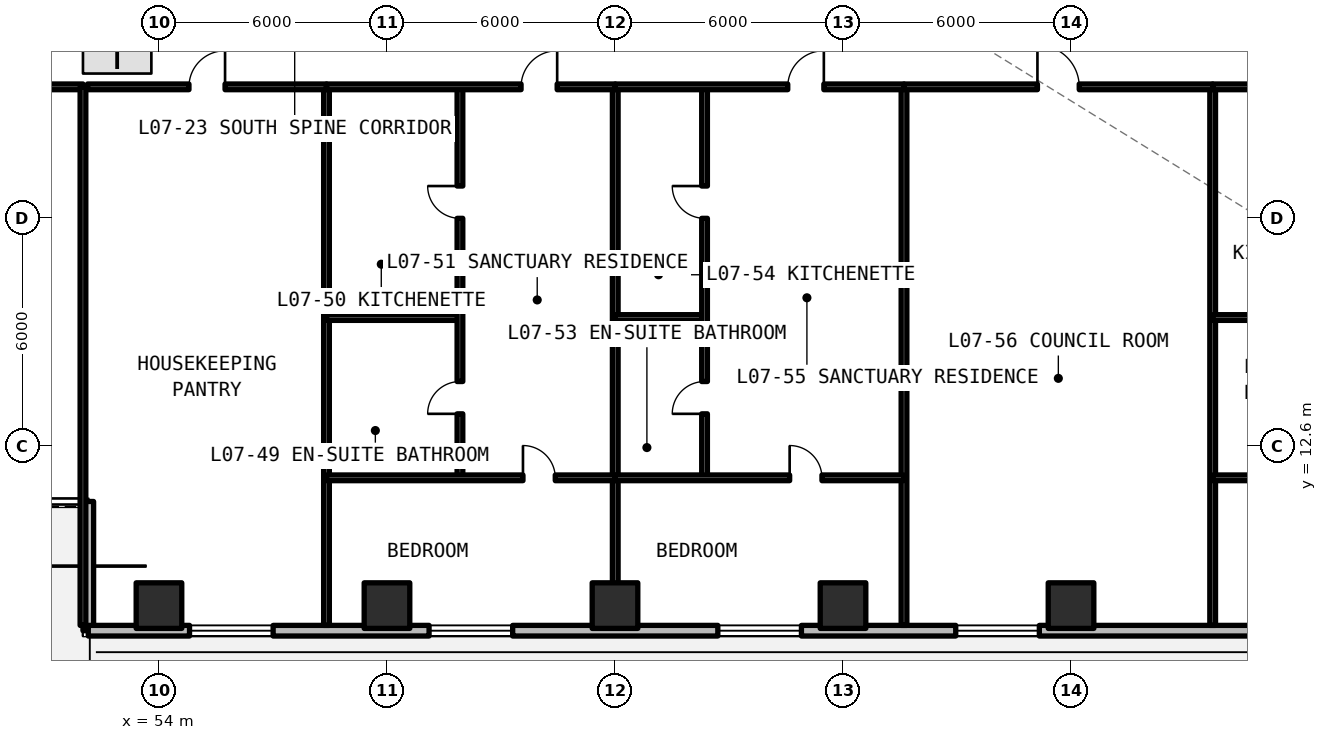
"""IFC4 building model, lengths in metres.
Left out: names, types, materials, properties, quantities, classifications, styles, units other than length and angle.
Written with IfcOpenShell. Run it as: python <this file> out.ifc"""

import sys

from ifc_helpers import new_model, si_unit, direction, frame, frame_2d, origin, origin_2d, place, context, subcontext, project, spatial, rectangle, extrude, element, fill, save


model = new_model("IFC4")
c1 = context("Model", 3, precision=1e-05, world=origin(), true_north=direction((0.0, 1.0)))
c2 = subcontext(c1, "Body", "Model", "MODEL_VIEW")
j1 = project(units=[si_unit("LENGTHUNIT", "METRE"), si_unit("PLANEANGLEUNIT", "RADIAN")], contexts=[c1])
p1 = place(None, origin())
s1 = spatial("IfcSite", under=j1, at=p1, CompositionType="ELEMENT")
p2 = place(p1, origin())
s2 = spatial("IfcBuilding", under=s1, at=p2, CompositionType="ELEMENT")
p3 = place(p2, frame((0.0, 0.0, 29.04)))
s3 = spatial("IfcBuildingStorey", under=s2, at=p3, CompositionType="ELEMENT", Elevation=29.04)
for number, where, z_axis, x_axis in (
    (1, (54.0, 8.4, -0.24), (0.0, 0.0, 1.0), (1.0, 0.0, 0.0)),
    (2, (60.0, 8.4, -0.24), (0.0, 0.0, 1.0), (1.0, 0.0, 0.0)),
    (3, (66.0, 8.4, -0.24), (0.0, 0.0, 1.0), (1.0, 0.0, 0.0)),
    (4, (72.0, 8.4, -0.24), (0.0, 0.0, 1.0), (1.0, 0.0, 0.0)),
    (5, (78.0, 8.4, -0.24), (0.0, 0.0, 1.0), (1.0, 0.0, 0.0)),
):
    element("IfcColumn", number, at=place(p3, frame(where, z_axis=z_axis, x_axis=x_axis)), inside=s3, PredefinedType="COLUMN", context=c2, shape_type="SweptSolid", body=[
        extrude(rectangle(XDim=1.2, YDim=1.2, at=origin_2d()), origin(), (0.0, 0.0, 1.0), 3.54),
    ])
p4 = place(p3, frame((52.14, 11.14, 0.0), z_axis=(0.0, 0.0, 1.0), x_axis=(0.0, -1.0, 0.0)))
e6 = element("IfcWall", 6, at=p4, inside=s3, PredefinedType="SOLIDWALL", context=c2, shape_type="SweptSolid", body=[
    extrude(rectangle(XDim=3.4, YDim=0.28, at=frame_2d((1.7, 0.0))), origin(), (0.0, 0.0, 1.0), 3.08),
])
p5 = place(p3, frame((52.14, 7.74, 0.0), z_axis=(0.0, 0.0, 1.0), x_axis=(1.0, 0.0, 0.0)))
e7 = element("IfcWall", 7, at=p5, inside=s3, PredefinedType="SOLIDWALL", context=c2, shape_type="SweptSolid", body=[
    extrude(rectangle(XDim=44.402, YDim=0.28, at=frame_2d((22.201, 0.0))), origin(), (0.0, 0.0, 1.0), 3.08),
])
p6 = place(p5, frame((2.664, 0.0, 0.78)))
e8 = element("IfcOpeningElement", 8, at=p6, cuts=e7, PredefinedType="OPENING", context=c2, shape_type="SweptSolid", body=[
    extrude(rectangle(XDim=2.2, YDim=1.66, at=frame_2d((1.1, 0.83))), frame((0.0, 0.15, 0.0), z_axis=(0.0, -1.0, 0.0), x_axis=(1.0, 0.0, 0.0)), (0.0, 0.0, 1.0), 0.3),
])
p7 = place(p5, frame((8.967, 0.0, 0.78)))
e9 = element("IfcOpeningElement", 9, at=p7, cuts=e7, PredefinedType="OPENING", context=c2, shape_type="SweptSolid", body=[
    extrude(rectangle(XDim=2.2, YDim=1.66, at=frame_2d((1.1, 0.83))), frame((0.0, 0.15, 0.0), z_axis=(0.0, -1.0, 0.0), x_axis=(1.0, 0.0, 0.0)), (0.0, 0.0, 1.0), 0.3),
])
p8 = place(p5, frame((16.566, 0.0, 0.78)))
e10 = element("IfcOpeningElement", 10, at=p8, cuts=e7, PredefinedType="OPENING", context=c2, shape_type="SweptSolid", body=[
    extrude(rectangle(XDim=2.2, YDim=1.66, at=frame_2d((1.1, 0.83))), frame((0.0, 0.15, 0.0), z_axis=(0.0, -1.0, 0.0), x_axis=(1.0, 0.0, 0.0)), (0.0, 0.0, 1.0), 0.3),
])
p9 = place(p5, frame((22.826, 0.0, 0.78)))
e11 = element("IfcOpeningElement", 11, at=p9, cuts=e7, PredefinedType="OPENING", context=c2, shape_type="SweptSolid", body=[
    extrude(rectangle(XDim=2.2, YDim=1.66, at=frame_2d((1.1, 0.83))), frame((0.0, 0.15, 0.0), z_axis=(0.0, -1.0, 0.0), x_axis=(1.0, 0.0, 0.0)), (0.0, 0.0, 1.0), 0.3),
])
p10 = place(p5, frame((32.766, 0.0, 0.78)))
e12 = element("IfcOpeningElement", 12, at=p10, cuts=e7, PredefinedType="OPENING", context=c2, shape_type="SweptSolid", body=[
    extrude(rectangle(XDim=2.2, YDim=1.66, at=frame_2d((1.1, 0.83))), frame((0.0, 0.15, 0.0), z_axis=(0.0, -1.0, 0.0), x_axis=(1.0, 0.0, 0.0)), (0.0, 0.0, 1.0), 0.3),
])
p11 = place(p5, frame((38.548, 0.0, 0.78)))
e13 = element("IfcOpeningElement", 13, at=p11, cuts=e7, PredefinedType="OPENING", context=c2, shape_type="SweptSolid", body=[
    extrude(rectangle(XDim=0.85, YDim=1.65, at=frame_2d((0.425, 0.825))), frame((0.0, 0.15, 0.0), z_axis=(0.0, -1.0, 0.0), x_axis=(1.0, 0.0, 0.0)), (0.0, 0.0, 1.0), 0.3),
])
p12 = place(p5, frame((40.91, 0.0, 0.78)))
e14 = element("IfcOpeningElement", 14, at=p12, cuts=e7, PredefinedType="OPENING", context=c2, shape_type="SweptSolid", body=[
    extrude(rectangle(XDim=2.2, YDim=1.66, at=frame_2d((1.1, 0.83))), frame((0.0, 0.15, 0.0), z_axis=(0.0, -1.0, 0.0), x_axis=(1.0, 0.0, 0.0)), (0.0, 0.0, 1.0), 0.3),
])
p13 = place(p3, frame((43.6, 22.05, 0.0), z_axis=(0.0, 0.0, 1.0), x_axis=(1.0, 0.0, 0.0)))
e15 = element("IfcWall", 15, at=p13, inside=s3, PredefinedType="SOLIDWALL", context=c2, shape_type="SweptSolid", body=[
    extrude(rectangle(XDim=8.4, YDim=0.15, at=frame_2d((4.2, 0.0))), origin(), (0.0, 0.0, 1.0), 2.35),
])
p14 = place(p13, frame((3.65, 0.0, 0.0)))
e16 = element("IfcOpeningElement", 16, at=p14, cuts=e15, PredefinedType="OPENING", context=c2, shape_type="SweptSolid", body=[
    extrude(rectangle(XDim=1.1, YDim=2.15, at=frame_2d((0.55, 1.075))), frame((0.0, 0.085, 0.0), z_axis=(0.0, -1.0, 0.0), x_axis=(1.0, 0.0, 0.0)), (0.0, 0.0, 1.0), 0.17),
])
for number, where, z_axis, x_axis in (
    (17, (52.0, 7.88, 0.0), (0.0, 0.0, 1.0), (0.0, 1.0, 0.0)),
    (18, (58.408, 7.88, 0.0), (0.0, 0.0, 1.0), (0.0, 1.0, 0.0)),
):
    element("IfcWall", number, at=place(p3, frame(where, z_axis=z_axis, x_axis=x_axis)), inside=s3, PredefinedType="SOLIDWALL", context=c2, shape_type="SweptSolid", body=[
        extrude(rectangle(XDim=14.17, YDim=0.15, at=frame_2d((7.085, 0.0))), origin(), (0.0, 0.0, 1.0), 2.35),
    ])
p15 = place(p3, frame((52.12, 22.05, 0.0), z_axis=(0.0, 0.0, 1.0), x_axis=(1.0, 0.0, 0.0)))
e19 = element("IfcWall", 19, at=p15, inside=s3, PredefinedType="SOLIDWALL", context=c2, shape_type="SweptSolid", body=[
    extrude(rectangle(XDim=6.288, YDim=0.15, at=frame_2d((3.144, 0.0))), origin(), (0.0, 0.0, 1.0), 2.35),
])
p16 = place(p15, frame((2.669, 0.0, 0.0)))
e20 = element("IfcOpeningElement", 20, at=p16, cuts=e19, PredefinedType="OPENING", context=c2, shape_type="SweptSolid", body=[
    extrude(rectangle(XDim=0.95, YDim=2.15, at=frame_2d((0.475, 1.075))), frame((0.0, 0.085, 0.0), z_axis=(0.0, -1.0, 0.0), x_axis=(1.0, 0.0, 0.0)), (0.0, 0.0, 1.0), 0.17),
])
p17 = place(p3, frame((66.007, 7.88, 0.0), z_axis=(0.0, 0.0, 1.0), x_axis=(0.0, 1.0, 0.0)))
e21 = element("IfcWall", 21, at=p17, inside=s3, PredefinedType="SOLIDWALL", context=c2, shape_type="SweptSolid", body=[
    extrude(rectangle(XDim=14.17, YDim=0.15, at=frame_2d((7.085, 0.0))), origin(), (0.0, 0.0, 1.0), 2.35),
])
p18 = place(p3, frame((58.408, 15.98, 0.0), z_axis=(0.0, 0.0, 1.0), x_axis=(1.0, 0.0, 0.0)))
e22 = element("IfcWall", 22, at=p18, inside=s3, PredefinedType="PARTITIONING", context=c2, shape_type="SweptSolid", body=[
    extrude(rectangle(XDim=3.512, YDim=0.15, at=frame_2d((1.756, 0.0))), origin(), (0.0, 0.0, 1.0), 2.35),
])
p19 = place(p3, frame((61.92, 11.762, 0.0), z_axis=(0.0, 0.0, 1.0), x_axis=(0.0, 1.0, 0.0)))
e23 = element("IfcWall", 23, at=p19, inside=s3, PredefinedType="PARTITIONING", context=c2, shape_type="SweptSolid", body=[
    extrude(rectangle(XDim=10.288, YDim=0.15, at=frame_2d((5.144, 0.0))), origin(), (0.0, 0.0, 1.0), 2.35),
])
p20 = place(p19, frame((1.684, 0.0, 0.0)))
e24 = element("IfcOpeningElement", 24, at=p20, cuts=e23, PredefinedType="OPENING", context=c2, shape_type="SweptSolid", body=[
    extrude(rectangle(XDim=0.85, YDim=2.1, at=frame_2d((0.425, 1.05))), frame((0.0, 0.085, 0.0), z_axis=(0.0, -1.0, 0.0), x_axis=(1.0, 0.0, 0.0)), (0.0, 0.0, 1.0), 0.17),
])
p21 = place(p19, frame((6.828, 0.0, 0.0)))
e25 = element("IfcOpeningElement", 25, at=p21, cuts=e23, PredefinedType="OPENING", context=c2, shape_type="SweptSolid", body=[
    extrude(rectangle(XDim=0.85, YDim=2.1, at=frame_2d((0.425, 1.05))), frame((0.0, 0.085, 0.0), z_axis=(0.0, -1.0, 0.0), x_axis=(1.0, 0.0, 0.0)), (0.0, 0.0, 1.0), 0.17),
])
p22 = place(p3, frame((58.408, 11.762, 0.0), z_axis=(0.0, 0.0, 1.0), x_axis=(1.0, 0.0, 0.0)))
e26 = element("IfcWall", 26, at=p22, inside=s3, PredefinedType="PARTITIONING", context=c2, shape_type="SweptSolid", body=[
    extrude(rectangle(XDim=7.598, YDim=0.15, at=frame_2d((3.799, 0.0))), origin(), (0.0, 0.0, 1.0), 2.35),
])
p23 = place(p22, frame((5.17, 0.0, 0.0)))
e27 = element("IfcOpeningElement", 27, at=p23, cuts=e26, PredefinedType="OPENING", context=c2, shape_type="SweptSolid", body=[
    extrude(rectangle(XDim=0.85, YDim=2.1, at=frame_2d((0.425, 1.05))), frame((0.0, 0.085, 0.0), z_axis=(0.0, -1.0, 0.0), x_axis=(1.0, 0.0, 0.0)), (0.0, 0.0, 1.0), 0.17),
])
p24 = place(p3, frame((58.408, 22.05, 0.0), z_axis=(0.0, 0.0, 1.0), x_axis=(1.0, 0.0, 0.0)))
e28 = element("IfcWall", 28, at=p24, inside=s3, PredefinedType="SOLIDWALL", context=c2, shape_type="SweptSolid", body=[
    extrude(rectangle(XDim=7.598, YDim=0.15, at=frame_2d((3.799, 0.0))), origin(), (0.0, 0.0, 1.0), 2.35),
])
p25 = place(p24, frame((5.12, 0.0, 0.0)))
e29 = element("IfcOpeningElement", 29, at=p25, cuts=e28, PredefinedType="OPENING", context=c2, shape_type="SweptSolid", body=[
    extrude(rectangle(XDim=0.95, YDim=2.15, at=frame_2d((0.475, 1.075))), frame((0.0, 0.085, 0.0), z_axis=(0.0, -1.0, 0.0), x_axis=(1.0, 0.0, 0.0)), (0.0, 0.0, 1.0), 0.17),
])
p26 = place(p3, frame((73.605, 7.88, 0.0), z_axis=(0.0, 0.0, 1.0), x_axis=(0.0, 1.0, 0.0)))
e30 = element("IfcWall", 30, at=p26, inside=s3, PredefinedType="SOLIDWALL", context=c2, shape_type="SweptSolid", body=[
    extrude(rectangle(XDim=14.17, YDim=0.15, at=frame_2d((7.085, 0.0))), origin(), (0.0, 0.0, 1.0), 2.35),
])
p27 = place(p3, frame((66.007, 15.98, 0.0), z_axis=(0.0, 0.0, 1.0), x_axis=(1.0, 0.0, 0.0)))
e31 = element("IfcWall", 31, at=p27, inside=s3, PredefinedType="PARTITIONING", context=c2, shape_type="SweptSolid", body=[
    extrude(rectangle(XDim=2.35, YDim=0.15, at=frame_2d((1.175, 0.0))), origin(), (0.0, 0.0, 1.0), 2.35),
])
p28 = place(p3, frame((68.357, 11.762, 0.0), z_axis=(0.0, 0.0, 1.0), x_axis=(0.0, 1.0, 0.0)))
e32 = element("IfcWall", 32, at=p28, inside=s3, PredefinedType="PARTITIONING", context=c2, shape_type="SweptSolid", body=[
    extrude(rectangle(XDim=10.288, YDim=0.15, at=frame_2d((5.144, 0.0))), origin(), (0.0, 0.0, 1.0), 2.35),
])
p29 = place(p28, frame((1.684, 0.0, 0.0)))
e33 = element("IfcOpeningElement", 33, at=p29, cuts=e32, PredefinedType="OPENING", context=c2, shape_type="SweptSolid", body=[
    extrude(rectangle(XDim=0.85, YDim=2.1, at=frame_2d((0.425, 1.05))), frame((0.0, 0.085, 0.0), z_axis=(0.0, -1.0, 0.0), x_axis=(1.0, 0.0, 0.0)), (0.0, 0.0, 1.0), 0.17),
])
p30 = place(p28, frame((6.828, 0.0, 0.0)))
e34 = element("IfcOpeningElement", 34, at=p30, cuts=e32, PredefinedType="OPENING", context=c2, shape_type="SweptSolid", body=[
    extrude(rectangle(XDim=0.85, YDim=2.1, at=frame_2d((0.425, 1.05))), frame((0.0, 0.085, 0.0), z_axis=(0.0, -1.0, 0.0), x_axis=(1.0, 0.0, 0.0)), (0.0, 0.0, 1.0), 0.17),
])
p31 = place(p3, frame((66.007, 11.762, 0.0), z_axis=(0.0, 0.0, 1.0), x_axis=(1.0, 0.0, 0.0)))
e35 = element("IfcWall", 35, at=p31, inside=s3, PredefinedType="PARTITIONING", context=c2, shape_type="SweptSolid", body=[
    extrude(rectangle(XDim=7.598, YDim=0.15, at=frame_2d((3.799, 0.0))), origin(), (0.0, 0.0, 1.0), 2.35),
])
p32 = place(p31, frame((4.589, 0.0, 0.0)))
e36 = element("IfcOpeningElement", 36, at=p32, cuts=e35, PredefinedType="OPENING", context=c2, shape_type="SweptSolid", body=[
    extrude(rectangle(XDim=0.85, YDim=2.1, at=frame_2d((0.425, 1.05))), frame((0.0, 0.085, 0.0), z_axis=(0.0, -1.0, 0.0), x_axis=(1.0, 0.0, 0.0)), (0.0, 0.0, 1.0), 0.17),
])
p33 = place(p3, frame((66.007, 22.05, 0.0), z_axis=(0.0, 0.0, 1.0), x_axis=(1.0, 0.0, 0.0)))
e37 = element("IfcWall", 37, at=p33, inside=s3, PredefinedType="SOLIDWALL", context=c2, shape_type="SweptSolid", body=[
    extrude(rectangle(XDim=7.598, YDim=0.15, at=frame_2d((3.799, 0.0))), origin(), (0.0, 0.0, 1.0), 2.35),
])
p34 = place(p33, frame((4.539, 0.0, 0.0)))
e38 = element("IfcOpeningElement", 38, at=p34, cuts=e37, PredefinedType="OPENING", context=c2, shape_type="SweptSolid", body=[
    extrude(rectangle(XDim=0.95, YDim=2.15, at=frame_2d((0.475, 1.075))), frame((0.0, 0.085, 0.0), z_axis=(0.0, -1.0, 0.0), x_axis=(1.0, 0.0, 0.0)), (0.0, 0.0, 1.0), 0.17),
])
p35 = place(p3, frame((81.727, 7.88, 0.0), z_axis=(0.0, 0.0, 1.0), x_axis=(0.0, 1.0, 0.0)))
e39 = element("IfcWall", 39, at=p35, inside=s3, PredefinedType="SOLIDWALL", context=c2, shape_type="SweptSolid", body=[
    extrude(rectangle(XDim=14.17, YDim=0.15, at=frame_2d((7.085, 0.0))), origin(), (0.0, 0.0, 1.0), 2.35),
])
p36 = place(p3, frame((73.605, 22.05, 0.0), z_axis=(0.0, 0.0, 1.0), x_axis=(1.0, 0.0, 0.0)))
e40 = element("IfcWall", 40, at=p36, inside=s3, PredefinedType="SOLIDWALL", context=c2, shape_type="SweptSolid", body=[
    extrude(rectangle(XDim=8.122, YDim=0.15, at=frame_2d((4.061, 0.0))), origin(), (0.0, 0.0, 1.0), 2.35),
])
p37 = place(p36, frame((3.511, 0.0, 0.0)))
e41 = element("IfcOpeningElement", 41, at=p37, cuts=e40, PredefinedType="OPENING", context=c2, shape_type="SweptSolid", body=[
    extrude(rectangle(XDim=1.1, YDim=2.15, at=frame_2d((0.55, 1.075))), frame((0.0, 0.085, 0.0), z_axis=(0.0, -1.0, 0.0), x_axis=(1.0, 0.0, 0.0)), (0.0, 0.0, 1.0), 0.17),
])
p38 = place(p3, frame((81.727, 15.98, 0.0), z_axis=(0.0, 0.0, 1.0), x_axis=(1.0, 0.0, 0.0)))
e42 = element("IfcWall", 42, at=p38, inside=s3, PredefinedType="PARTITIONING", context=c2, shape_type="SweptSolid", body=[
    extrude(rectangle(XDim=4.193, YDim=0.15, at=frame_2d((2.096, 0.0))), origin(), (0.0, 0.0, 1.0), 2.35),
])
p39 = place(p3, frame((81.727, 11.762, 0.0), z_axis=(0.0, 0.0, 1.0), x_axis=(1.0, 0.0, 0.0)))
e43 = element("IfcWall", 43, at=p39, inside=s3, PredefinedType="PARTITIONING", context=c2, shape_type="SweptSolid", body=[
    extrude(rectangle(XDim=7.598, YDim=0.15, at=frame_2d((3.799, 0.0))), origin(), (0.0, 0.0, 1.0), 2.35),
])
p40 = place(p39, frame((5.51, 0.0, 0.0)))
e44 = element("IfcOpeningElement", 44, at=p40, cuts=e43, PredefinedType="OPENING", context=c2, shape_type="SweptSolid", body=[
    extrude(rectangle(XDim=0.85, YDim=2.1, at=frame_2d((0.425, 1.05))), frame((0.0, 0.085, 0.0), z_axis=(0.0, -1.0, 0.0), x_axis=(1.0, 0.0, 0.0)), (0.0, 0.0, 1.0), 0.17),
])
p41 = place(p3, frame((81.727, 22.05, 0.0), z_axis=(0.0, 0.0, 1.0), x_axis=(1.0, 0.0, 0.0)))
e45 = element("IfcWall", 45, at=p41, inside=s3, PredefinedType="SOLIDWALL", context=c2, shape_type="SweptSolid", body=[
    extrude(rectangle(XDim=7.598, YDim=0.15, at=frame_2d((3.799, 0.0))), origin(), (0.0, 0.0, 1.0), 2.35),
])
p42 = place(p41, frame((5.46, 0.0, 0.0)))
e46 = element("IfcOpeningElement", 46, at=p42, cuts=e45, PredefinedType="OPENING", context=c2, shape_type="SweptSolid", body=[
    extrude(rectangle(XDim=0.95, YDim=2.15, at=frame_2d((0.475, 1.075))), frame((0.0, 0.085, 0.0), z_axis=(0.0, -1.0, 0.0), x_axis=(1.0, 0.0, 0.0)), (0.0, 0.0, 1.0), 0.17),
])
p43 = place(p6, origin())
e47 = element("IfcWindow", 47, at=p43, inside=s3, PartitioningType="SINGLE_PANEL", PredefinedType="WINDOW", context=c2, shape_type="SweptSolid", body=[
    extrude(rectangle(XDim=2.2, YDim=1.66, at=frame_2d((1.1, 0.83))), frame((0.0, 0.03, 0.0), z_axis=(0.0, -1.0, 0.0), x_axis=(1.0, 0.0, 0.0)), (0.0, 0.0, 1.0), 0.06),
])
fill(e8, e47)
p44 = place(p7, origin())
e48 = element("IfcWindow", 48, at=p44, inside=s3, PartitioningType="SINGLE_PANEL", PredefinedType="WINDOW", context=c2, shape_type="SweptSolid", body=[
    extrude(rectangle(XDim=2.2, YDim=1.66, at=frame_2d((1.1, 0.83))), frame((0.0, 0.03, 0.0), z_axis=(0.0, -1.0, 0.0), x_axis=(1.0, 0.0, 0.0)), (0.0, 0.0, 1.0), 0.06),
])
fill(e9, e48)
p45 = place(p8, origin())
e49 = element("IfcWindow", 49, at=p45, inside=s3, PartitioningType="SINGLE_PANEL", PredefinedType="WINDOW", context=c2, shape_type="SweptSolid", body=[
    extrude(rectangle(XDim=2.2, YDim=1.66, at=frame_2d((1.1, 0.83))), frame((0.0, 0.03, 0.0), z_axis=(0.0, -1.0, 0.0), x_axis=(1.0, 0.0, 0.0)), (0.0, 0.0, 1.0), 0.06),
])
fill(e10, e49)
p46 = place(p9, origin())
e50 = element("IfcWindow", 50, at=p46, inside=s3, PartitioningType="SINGLE_PANEL", PredefinedType="WINDOW", context=c2, shape_type="SweptSolid", body=[
    extrude(rectangle(XDim=2.2, YDim=1.66, at=frame_2d((1.1, 0.83))), frame((0.0, 0.03, 0.0), z_axis=(0.0, -1.0, 0.0), x_axis=(1.0, 0.0, 0.0)), (0.0, 0.0, 1.0), 0.06),
])
fill(e11, e50)
p47 = place(p16, origin())
e51 = element("IfcDoor", 51, at=p47, inside=s3, OperationType="SINGLE_SWING_RIGHT", PredefinedType="DOOR", context=c2, shape_type="SweptSolid", body=[
    extrude(rectangle(XDim=0.95, YDim=2.15, at=frame_2d((0.475, 1.075))), frame((0.0, 0.025, 0.0), z_axis=(0.0, -1.0, 0.0), x_axis=(1.0, 0.0, 0.0)), (0.0, 0.0, 1.0), 0.05),
])
fill(e20, e51)
p48 = place(p20, origin())
e52 = element("IfcDoor", 52, at=p48, inside=s3, OperationType="SINGLE_SWING_LEFT", PredefinedType="DOOR", context=c2, shape_type="SweptSolid", body=[
    extrude(rectangle(XDim=0.85, YDim=2.1, at=frame_2d((0.425, 1.05))), frame((0.0, 0.025, 0.0), z_axis=(0.0, -1.0, 0.0), x_axis=(1.0, 0.0, 0.0)), (0.0, 0.0, 1.0), 0.05),
])
fill(e24, e52)
p49 = place(p21, origin())
e53 = element("IfcDoor", 53, at=p49, inside=s3, OperationType="SINGLE_SWING_RIGHT", PredefinedType="DOOR", context=c2, shape_type="SweptSolid", body=[
    extrude(rectangle(XDim=0.85, YDim=2.1, at=frame_2d((0.425, 1.05))), frame((0.0, 0.025, 0.0), z_axis=(0.0, -1.0, 0.0), x_axis=(1.0, 0.0, 0.0)), (0.0, 0.0, 1.0), 0.05),
])
fill(e25, e53)
p50 = place(p23, origin())
e54 = element("IfcDoor", 54, at=p50, inside=s3, OperationType="SINGLE_SWING_LEFT", PredefinedType="DOOR", context=c2, shape_type="SweptSolid", body=[
    extrude(rectangle(XDim=0.85, YDim=2.1, at=frame_2d((0.425, 1.05))), frame((0.0, 0.025, 0.0), z_axis=(0.0, -1.0, 0.0), x_axis=(1.0, 0.0, 0.0)), (0.0, 0.0, 1.0), 0.05),
])
fill(e27, e54)
p51 = place(p25, origin())
e55 = element("IfcDoor", 55, at=p51, inside=s3, OperationType="SINGLE_SWING_RIGHT", PredefinedType="DOOR", context=c2, shape_type="SweptSolid", body=[
    extrude(rectangle(XDim=0.95, YDim=2.15, at=frame_2d((0.475, 1.075))), frame((0.0, 0.025, 0.0), z_axis=(0.0, -1.0, 0.0), x_axis=(1.0, 0.0, 0.0)), (0.0, 0.0, 1.0), 0.05),
])
fill(e29, e55)
p52 = place(p29, origin())
e56 = element("IfcDoor", 56, at=p52, inside=s3, OperationType="SINGLE_SWING_LEFT", PredefinedType="DOOR", context=c2, shape_type="SweptSolid", body=[
    extrude(rectangle(XDim=0.85, YDim=2.1, at=frame_2d((0.425, 1.05))), frame((0.0, 0.025, 0.0), z_axis=(0.0, -1.0, 0.0), x_axis=(1.0, 0.0, 0.0)), (0.0, 0.0, 1.0), 0.05),
])
fill(e33, e56)
p53 = place(p30, origin())
e57 = element("IfcDoor", 57, at=p53, inside=s3, OperationType="SINGLE_SWING_RIGHT", PredefinedType="DOOR", context=c2, shape_type="SweptSolid", body=[
    extrude(rectangle(XDim=0.85, YDim=2.1, at=frame_2d((0.425, 1.05))), frame((0.0, 0.025, 0.0), z_axis=(0.0, -1.0, 0.0), x_axis=(1.0, 0.0, 0.0)), (0.0, 0.0, 1.0), 0.05),
])
fill(e34, e57)
p54 = place(p32, origin())
e58 = element("IfcDoor", 58, at=p54, inside=s3, OperationType="SINGLE_SWING_LEFT", PredefinedType="DOOR", context=c2, shape_type="SweptSolid", body=[
    extrude(rectangle(XDim=0.85, YDim=2.1, at=frame_2d((0.425, 1.05))), frame((0.0, 0.025, 0.0), z_axis=(0.0, -1.0, 0.0), x_axis=(1.0, 0.0, 0.0)), (0.0, 0.0, 1.0), 0.05),
])
fill(e36, e58)
p55 = place(p34, origin())
e59 = element("IfcDoor", 59, at=p55, inside=s3, OperationType="SINGLE_SWING_RIGHT", PredefinedType="DOOR", context=c2, shape_type="SweptSolid", body=[
    extrude(rectangle(XDim=0.95, YDim=2.15, at=frame_2d((0.475, 1.075))), frame((0.0, 0.025, 0.0), z_axis=(0.0, -1.0, 0.0), x_axis=(1.0, 0.0, 0.0)), (0.0, 0.0, 1.0), 0.05),
])
fill(e38, e59)
p56 = place(p37, origin())
e60 = element("IfcDoor", 60, at=p56, inside=s3, OperationType="SINGLE_SWING_LEFT", PredefinedType="DOOR", context=c2, shape_type="SweptSolid", body=[
    extrude(rectangle(XDim=1.1, YDim=2.15, at=frame_2d((0.55, 1.075))), frame((0.0, 0.025, 0.0), z_axis=(0.0, -1.0, 0.0), x_axis=(1.0, 0.0, 0.0)), (0.0, 0.0, 1.0), 0.05),
])
fill(e41, e60)
save(model, sys.argv[1])
